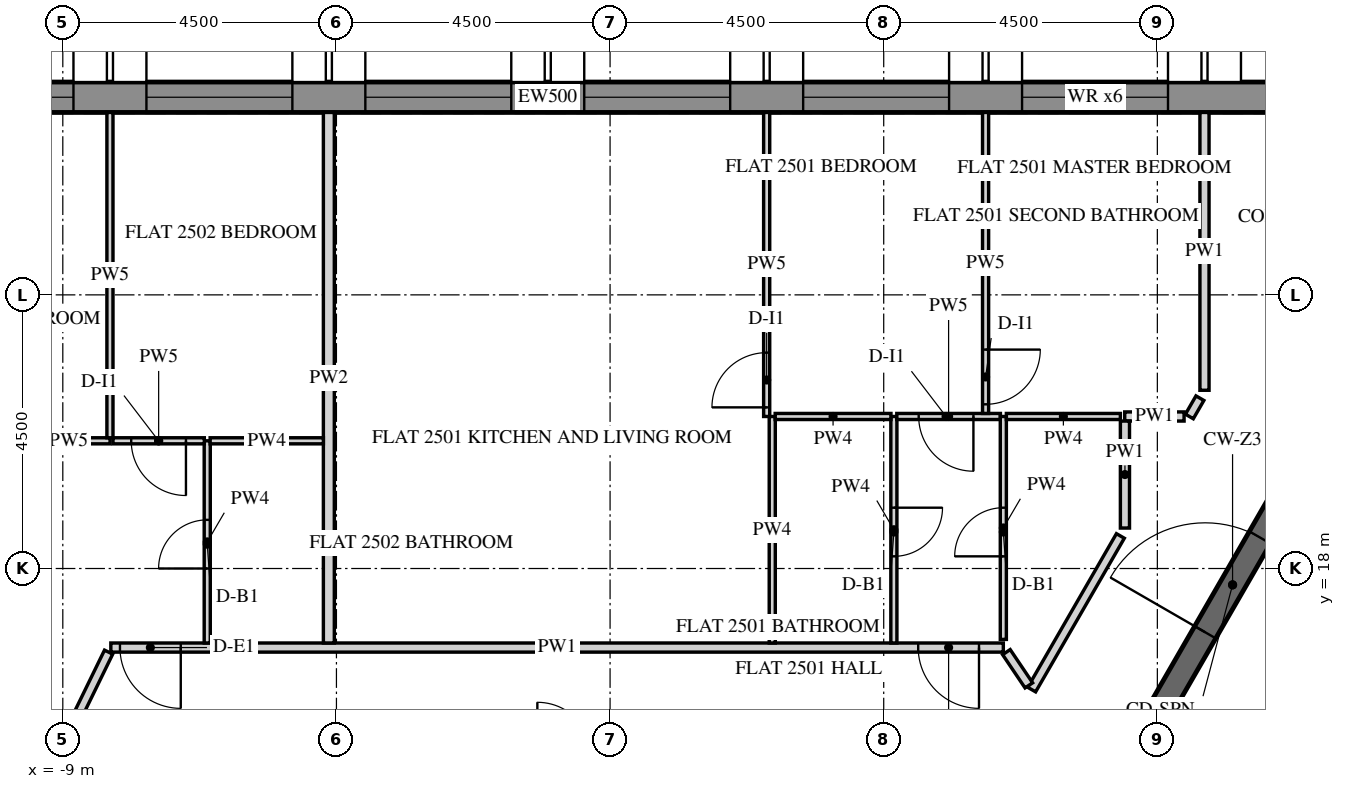
"""IFC4 building model, lengths in metres.
Left out: names, types, materials, properties, quantities, classifications, styles, units other than length and angle.
Written with IfcOpenShell. Run it as: python <this file> out.ifc"""

import sys

from ifc_helpers import new_model, si_unit, direction, frame, frame_2d, origin, place, context, subcontext, project, spatial, polyline, rectangle, outline, extrude, element, fill, save


model = new_model("IFC4")
c1 = context("Model", 3, precision=1e-05, world=origin(), true_north=direction((0.0, 1.0)))
c2 = subcontext(c1, "Body", "Model", "MODEL_VIEW")
j1 = project(units=[si_unit("LENGTHUNIT", "METRE"), si_unit("PLANEANGLEUNIT", "RADIAN")], contexts=[c1])
p1 = place(None, origin())
s1 = spatial("IfcSite", under=j1, at=p1, CompositionType="ELEMENT")
p2 = place(p1, origin())
s2 = spatial("IfcBuilding", under=s1, at=p2, CompositionType="ELEMENT")
p3 = place(p2, frame((0.0, 0.0, 314.7)))
s3 = spatial("IfcBuildingStorey", under=s2, at=p3, CompositionType="ELEMENT", Elevation=314.7)
p4 = place(p3, frame((11.698, 25.75, -0.15), z_axis=(0.0, 0.0, 1.0), x_axis=(-1.0, 0.0, 0.0)))
e1 = element("IfcWall", 1, at=p4, inside=s3, PredefinedType="SOLIDWALL", context=c2, shape_type="SweptSolid", body=[
    extrude(outline(polyline([(-0.021, -0.25), (25.468, -0.25), (25.421, 0.25), (0.021, 0.25), (-0.021, -0.25)])), origin(), (0.0, 0.0, 1.0), 3.9),
])
p5 = place(p4, frame((2.522, 0.0, 0.75)))
e2 = element("IfcOpeningElement", 2, at=p5, cuts=e1, PredefinedType="OPENING", context=c2, shape_type="SweptSolid", body=[
    extrude(rectangle(XDim=2.4, YDim=2.7, at=frame_2d((1.2, 1.35))), frame((0.0, 0.26, 0.0), z_axis=(0.0, -1.0, 0.0), x_axis=(1.0, 0.0, 0.0)), (0.0, 0.0, 1.0), 0.52),
])
p6 = place(p4, frame((6.122, 0.0, 0.75)))
e3 = element("IfcOpeningElement", 3, at=p6, cuts=e1, PredefinedType="OPENING", context=c2, shape_type="SweptSolid", body=[
    extrude(rectangle(XDim=2.4, YDim=2.7, at=frame_2d((1.2, 1.35))), frame((0.0, 0.26, 0.0), z_axis=(0.0, -1.0, 0.0), x_axis=(1.0, 0.0, 0.0)), (0.0, 0.0, 1.0), 0.52),
])
p7 = place(p4, frame((9.722, 0.0, 0.75)))
e4 = element("IfcOpeningElement", 4, at=p7, cuts=e1, PredefinedType="OPENING", context=c2, shape_type="SweptSolid", body=[
    extrude(rectangle(XDim=2.4, YDim=2.7, at=frame_2d((1.2, 1.35))), frame((0.0, 0.26, 0.0), z_axis=(0.0, -1.0, 0.0), x_axis=(1.0, 0.0, 0.0)), (0.0, 0.0, 1.0), 0.52),
])
p8 = place(p4, frame((13.323, 0.0, 0.75)))
e5 = element("IfcOpeningElement", 5, at=p8, cuts=e1, PredefinedType="OPENING", context=c2, shape_type="SweptSolid", body=[
    extrude(rectangle(XDim=2.4, YDim=2.7, at=frame_2d((1.2, 1.35))), frame((0.0, 0.26, 0.0), z_axis=(0.0, -1.0, 0.0), x_axis=(1.0, 0.0, 0.0)), (0.0, 0.0, 1.0), 0.52),
])
p9 = place(p4, frame((16.922, 0.0, 0.75)))
e6 = element("IfcOpeningElement", 6, at=p9, cuts=e1, PredefinedType="OPENING", context=c2, shape_type="SweptSolid", body=[
    extrude(rectangle(XDim=2.4, YDim=2.7, at=frame_2d((1.2, 1.35))), frame((0.0, 0.26, 0.0), z_axis=(0.0, -1.0, 0.0), x_axis=(1.0, 0.0, 0.0)), (0.0, 0.0, 1.0), 0.52),
])
p10 = place(p4, frame((20.522, 0.0, 0.75)))
e7 = element("IfcOpeningElement", 7, at=p10, cuts=e1, PredefinedType="OPENING", context=c2, shape_type="SweptSolid", body=[
    extrude(rectangle(XDim=2.4, YDim=2.7, at=frame_2d((1.2, 1.35))), frame((0.0, 0.26, 0.0), z_axis=(0.0, -1.0, 0.0), x_axis=(1.0, 0.0, 0.0)), (0.0, 0.0, 1.0), 0.52),
])
p11 = place(p3, frame((6.351, 11.0, -0.15), z_axis=(0.0, 0.0, 1.0), x_axis=(0.499998894578, 0.866026041999, 0.0)))
e8 = element("IfcWall", 8, at=p11, inside=s3, PredefinedType="SHEAR", context=c2, shape_type="SweptSolid", body=[
    extrude(rectangle(XDim=15.544, YDim=0.4, at=frame_2d((7.772, 0.0))), origin(), (0.0, 0.0, 1.0), 3.9),
])
p12 = place(p11, frame((6.872, 0.0, 0.15)))
e9 = element("IfcOpeningElement", 9, at=p12, cuts=e8, PredefinedType="OPENING", context=c2, shape_type="SweptSolid", body=[
    extrude(rectangle(XDim=1.8, YDim=2.4, at=frame_2d((0.9, 1.2))), frame((0.0, 0.21, 0.0), z_axis=(0.0, -1.0, 0.0), x_axis=(1.0, 0.0, 0.0)), (0.0, 0.0, 1.0), 0.42),
])
p13 = place(p3, frame((6.467, 16.7, 0.0), z_axis=(0.0, 0.0, 1.0), x_axis=(-1.0, 0.0, 0.0)))
e10 = element("IfcWall", 10, at=p13, inside=s3, PredefinedType="PARTITIONING", context=c2, shape_type="SweptSolid", body=[
    extrude(rectangle(XDim=14.677, YDim=0.15, at=frame_2d((7.339, 0.0))), origin(), (0.0, 0.0, 1.0), 2.988),
])
p14 = place(p13, frame((0.4, 0.0, 0.0)))
e11 = element("IfcOpeningElement", 11, at=p14, cuts=e10, PredefinedType="OPENING", context=c2, shape_type="SweptSolid", body=[
    extrude(rectangle(XDim=1.0, YDim=2.1, at=frame_2d((0.5, 1.05))), frame((0.0, 0.085, 0.0), z_axis=(0.0, -1.0, 0.0), x_axis=(1.0, 0.0, 0.0)), (0.0, 0.0, 1.0), 0.17),
])
p15 = place(p13, frame((13.527, 0.0, 0.0)))
e12 = element("IfcOpeningElement", 12, at=p15, cuts=e10, PredefinedType="OPENING", context=c2, shape_type="SweptSolid", body=[
    extrude(rectangle(XDim=1.0, YDim=2.1, at=frame_2d((0.5, 1.05))), frame((0.0, 0.085, 0.0), z_axis=(0.0, -1.0, 0.0), x_axis=(1.0, 0.0, 0.0)), (0.0, 0.0, 1.0), 0.17),
])
p16 = place(p3, frame((9.775, 25.5, 0.0), z_axis=(0.0, 0.0, 1.0), x_axis=(0.0, -1.0, 0.0)))
e13 = element("IfcWall", 13, at=p16, inside=s3, PredefinedType="PARTITIONING", context=c2, shape_type="SweptSolid", body=[
    extrude(rectangle(XDim=4.569, YDim=0.15, at=frame_2d((2.284, 0.0))), origin(), (0.0, 0.0, 1.0), 2.988),
])
p17 = place(p3, frame((9.7, 20.801, 0.0), z_axis=(0.0, 0.0, 1.0), x_axis=(-0.499762962979, -0.866162213927, 0.0)))
e14 = element("IfcWall", 14, at=p17, inside=s3, PredefinedType="PARTITIONING", context=c2, shape_type="SweptSolid", body=[
    extrude(rectangle(XDim=0.348, YDim=0.15, at=frame_2d((0.174, 0.0))), origin(), (0.0, 0.0, 1.0), 2.988),
])
p18 = place(p3, frame((9.44, 20.5, 0.0), z_axis=(0.0, 0.0, 1.0), x_axis=(-1.0, 0.0, 0.0)))
e15 = element("IfcWall", 15, at=p18, inside=s3, PredefinedType="PARTITIONING", context=c2, shape_type="SweptSolid", body=[
    extrude(rectangle(XDim=0.976, YDim=0.15, at=frame_2d((0.488, 0.0))), origin(), (0.0, 0.0, 1.0), 2.988),
])
p19 = place(p3, frame((8.467, 20.425, 0.0), z_axis=(0.0, 0.0, 1.0), x_axis=(0.0, -1.0, 0.0)))
e16 = element("IfcWall", 16, at=p19, inside=s3, PredefinedType="PARTITIONING", context=c2, shape_type="SweptSolid", body=[
    extrude(rectangle(XDim=1.76, YDim=0.15, at=frame_2d((0.88, 0.0))), origin(), (0.0, 0.0, 1.0), 2.988),
])
p20 = place(p3, frame((8.392, 18.536, 0.0), z_axis=(0.0, 0.0, 1.0), x_axis=(-0.49996389635, -0.866046247233, 0.0)))
e17 = element("IfcWall", 17, at=p20, inside=s3, PredefinedType="PARTITIONING", context=c2, shape_type="SweptSolid", body=[
    extrude(rectangle(XDim=2.918, YDim=0.15, at=frame_2d((1.459, 0.0))), origin(), (0.0, 0.0, 1.0), 2.988),
])
p21 = place(p3, frame((6.887, 16.078, 0.0), z_axis=(0.0, 0.0, 1.0), x_axis=(-0.559472855001, 0.828848674076, 0.0)))
e18 = element("IfcWall", 18, at=p21, inside=s3, PredefinedType="PARTITIONING", context=c2, shape_type="SweptSolid", body=[
    extrude(rectangle(XDim=0.66, YDim=0.15, at=frame_2d((0.33, 0.0))), origin(), (0.0, 0.0, 1.0), 2.988),
])
p22 = place(p3, frame((-8.247, 16.625, 0.0), z_axis=(0.0, 0.0, 1.0), x_axis=(-0.438381655451, -0.898788920806, 0.0)))
e19 = element("IfcWall", 19, at=p22, inside=s3, PredefinedType="PARTITIONING", context=c2, shape_type="SweptSolid", body=[
    extrude(rectangle(XDim=16.272, YDim=0.15, at=frame_2d((8.136, 0.0))), origin(), (0.0, 0.0, 1.0), 2.988),
])
p23 = place(p22, frame((5.703, 0.0, 0.0)))
e20 = element("IfcOpeningElement", 20, at=p23, cuts=e19, PredefinedType="OPENING", context=c2, shape_type="SweptSolid", body=[
    extrude(rectangle(XDim=1.0, YDim=2.1, at=frame_2d((0.5, 1.05))), frame((0.0, 0.085, 0.0), z_axis=(0.0, -1.0, 0.0), x_axis=(1.0, 0.0, 0.0)), (0.0, 0.0, 1.0), 0.17),
])
p24 = place(p3, frame((9.464, 12.392, 0.0), z_axis=(0.0, 0.0, 1.0), x_axis=(0.499999400414, 0.866025749955, 0.0)))
e21 = element("IfcWall", 21, at=p24, inside=s3, PredefinedType="PARTITIONING", context=c2, shape_type="SweptSolid", body=[
    extrude(rectangle(XDim=7.911, YDim=0.15, at=frame_2d((3.955, 0.0))), origin(), (0.0, 0.0, 1.0), 2.988),
])
p25 = place(p24, frame((0.82, 0.0, 0.0)))
e22 = element("IfcOpeningElement", 22, at=p25, cuts=e21, PredefinedType="OPENING", context=c2, shape_type="SweptSolid", body=[
    extrude(rectangle(XDim=1.0, YDim=2.1, at=frame_2d((0.5, 1.05))), frame((0.0, 0.085, 0.0), z_axis=(0.0, -1.0, 0.0), x_axis=(1.0, 0.0, 0.0)), (0.0, 0.0, 1.0), 0.17),
])
p26 = place(p24, frame((4.817, 0.0, 0.0)))
e23 = element("IfcOpeningElement", 23, at=p26, cuts=e21, PredefinedType="OPENING", context=c2, shape_type="SweptSolid", body=[
    extrude(rectangle(XDim=1.0, YDim=2.1, at=frame_2d((0.5, 1.05))), frame((0.0, 0.085, 0.0), z_axis=(0.0, -1.0, 0.0), x_axis=(1.0, 0.0, 0.0)), (0.0, 0.0, 1.0), 0.17),
])
p27 = place(p3, frame((2.667, 16.775, 0.0), z_axis=(0.0, 0.0, 1.0), x_axis=(0.0, 1.0, 0.0)))
e24 = element("IfcWall", 24, at=p27, inside=s3, PredefinedType="PARTITIONING", context=c2, shape_type="SweptSolid", body=[
    extrude(rectangle(XDim=3.725, YDim=0.1, at=frame_2d((1.863, 0.0))), origin(), (0.0, 0.0, 1.0), 2.988),
])
p28 = place(p3, frame((2.575, 20.5, 0.0), z_axis=(0.0, 0.0, 1.0), x_axis=(0.0, 1.0, 0.0)))
e25 = element("IfcWall", 25, at=p28, inside=s3, PredefinedType="PARTITIONING", context=c2, shape_type="SweptSolid", body=[
    extrude(rectangle(XDim=5.0, YDim=0.1, at=frame_2d((2.5, 0.0))), origin(), (0.0, 0.0, 1.0), 2.988),
])
p29 = place(p28, frame((0.15, 0.0, 0.0)))
e26 = element("IfcOpeningElement", 26, at=p29, cuts=e25, PredefinedType="OPENING", context=c2, shape_type="SweptSolid", body=[
    extrude(rectangle(XDim=0.9, YDim=2.1, at=frame_2d((0.45, 1.05))), frame((0.0, 0.06, 0.0), z_axis=(0.0, -1.0, 0.0), x_axis=(1.0, 0.0, 0.0)), (0.0, 0.0, 1.0), 0.12),
])
p30 = place(p3, frame((-4.625, 25.5, 0.0), z_axis=(0.0, 0.0, 1.0), x_axis=(0.0, -1.0, 0.0)))
e27 = element("IfcWall", 27, at=p30, inside=s3, PredefinedType="PARTITIONING", context=c2, shape_type="SweptSolid", body=[
    extrude(rectangle(XDim=8.725, YDim=0.18, at=frame_2d((4.363, 0.0))), origin(), (0.0, 0.0, 1.0), 2.988),
])
p31 = place(p3, frame((4.667, 20.5, 0.0), z_axis=(0.0, 0.0, 1.0), x_axis=(0.0, -1.0, 0.0)))
e28 = element("IfcWall", 28, at=p31, inside=s3, PredefinedType="PARTITIONING", context=c2, shape_type="SweptSolid", body=[
    extrude(rectangle(XDim=3.725, YDim=0.1, at=frame_2d((1.863, 0.0))), origin(), (0.0, 0.0, 1.0), 2.988),
])
p32 = place(p31, frame((1.5, 0.0, 0.0)))
e29 = element("IfcOpeningElement", 29, at=p32, cuts=e28, PredefinedType="OPENING", context=c2, shape_type="SweptSolid", body=[
    extrude(rectangle(XDim=0.8, YDim=2.1, at=frame_2d((0.4, 1.05))), frame((0.0, 0.06, 0.0), z_axis=(0.0, -1.0, 0.0), x_axis=(1.0, 0.0, 0.0)), (0.0, 0.0, 1.0), 0.12),
])
p33 = place(p3, frame((6.419, 20.5, 0.0), z_axis=(0.0, 0.0, 1.0), x_axis=(-1.0, 0.0, 0.0)))
e30 = element("IfcWall", 30, at=p33, inside=s3, PredefinedType="PARTITIONING", context=c2, shape_type="SweptSolid", body=[
    extrude(rectangle(XDim=1.704, YDim=0.1, at=frame_2d((0.852, 0.0))), origin(), (0.0, 0.0, 1.0), 2.988),
])
p34 = place(p33, frame((0.444, 0.0, 0.0)))
e31 = element("IfcOpeningElement", 31, at=p34, cuts=e30, PredefinedType="OPENING", context=c2, shape_type="SweptSolid", body=[
    extrude(rectangle(XDim=0.9, YDim=2.1, at=frame_2d((0.45, 1.05))), frame((0.0, 0.06, 0.0), z_axis=(0.0, -1.0, 0.0), x_axis=(1.0, 0.0, 0.0)), (0.0, 0.0, 1.0), 0.12),
])
p35 = place(p3, frame((6.467, 16.834, 0.0), z_axis=(0.0, 0.0, 1.0), x_axis=(0.0, 1.0, 0.0)))
e32 = element("IfcWall", 32, at=p35, inside=s3, PredefinedType="PARTITIONING", context=c2, shape_type="SweptSolid", body=[
    extrude(rectangle(XDim=3.666, YDim=0.1, at=frame_2d((1.833, 0.0))), origin(), (0.0, 0.0, 1.0), 2.988),
])
p36 = place(p35, frame((1.366, 0.0, 0.0)))
e33 = element("IfcOpeningElement", 33, at=p36, cuts=e32, PredefinedType="OPENING", context=c2, shape_type="SweptSolid", body=[
    extrude(rectangle(XDim=0.8, YDim=2.1, at=frame_2d((0.4, 1.05))), frame((0.0, 0.06, 0.0), z_axis=(0.0, -1.0, 0.0), x_axis=(1.0, 0.0, 0.0)), (0.0, 0.0, 1.0), 0.12),
])
p37 = place(p3, frame((4.619, 20.5, 0.0), z_axis=(0.0, 0.0, 1.0), x_axis=(-1.0, 0.0, 0.0)))
e34 = element("IfcWall", 34, at=p37, inside=s3, PredefinedType="PARTITIONING", context=c2, shape_type="SweptSolid", body=[
    extrude(rectangle(XDim=1.904, YDim=0.1, at=frame_2d((0.952, 0.0))), origin(), (0.0, 0.0, 1.0), 2.988),
])
p38 = place(p3, frame((6.175, 25.5, 0.0), z_axis=(0.0, 0.0, 1.0), x_axis=(0.0, -1.0, 0.0)))
e35 = element("IfcWall", 35, at=p38, inside=s3, PredefinedType="PARTITIONING", context=c2, shape_type="SweptSolid", body=[
    extrude(rectangle(XDim=4.95, YDim=0.1, at=frame_2d((2.475, 0.0))), origin(), (0.0, 0.0, 1.0), 2.988),
])
p39 = place(p38, frame((3.9, 0.0, 0.0)))
e36 = element("IfcOpeningElement", 36, at=p39, cuts=e35, PredefinedType="OPENING", context=c2, shape_type="SweptSolid", body=[
    extrude(rectangle(XDim=0.9, YDim=2.1, at=frame_2d((0.45, 1.05))), frame((0.0, 0.06, 0.0), z_axis=(0.0, -1.0, 0.0), x_axis=(1.0, 0.0, 0.0)), (0.0, 0.0, 1.0), 0.12),
])
p40 = place(p3, frame((6.517, 20.5, 0.0), z_axis=(0.0, 0.0, 1.0), x_axis=(1.0, 0.0, 0.0)))
e37 = element("IfcWall", 37, at=p40, inside=s3, PredefinedType="PARTITIONING", context=c2, shape_type="SweptSolid", body=[
    extrude(rectangle(XDim=1.875, YDim=0.1, at=frame_2d((0.938, 0.0))), origin(), (0.0, 0.0, 1.0), 2.988),
])
p41 = place(p3, frame((-9.575, 20.1, 0.0), z_axis=(0.0, 0.0, 1.0), x_axis=(1.0, 0.0, 0.0)))
e38 = element("IfcWall", 38, at=p41, inside=s3, PredefinedType="PARTITIONING", context=c2, shape_type="SweptSolid", body=[
    extrude(rectangle(XDim=1.352, YDim=0.1, at=frame_2d((0.676, 0.0))), origin(), (0.0, 0.0, 1.0), 2.988),
])
p42 = place(p3, frame((-8.225, 20.15, 0.0), z_axis=(0.0, 0.0, 1.0), x_axis=(0.0, 1.0, 0.0)))
e39 = element("IfcWall", 39, at=p42, inside=s3, PredefinedType="PARTITIONING", context=c2, shape_type="SweptSolid", body=[
    extrude(rectangle(XDim=5.35, YDim=0.1, at=frame_2d((2.675, 0.0))), origin(), (0.0, 0.0, 1.0), 2.988),
])
p43 = place(p3, frame((-6.625, 16.775, 0.0), z_axis=(0.0, 0.0, 1.0), x_axis=(0.0, 1.0, 0.0)))
e40 = element("IfcWall", 40, at=p43, inside=s3, PredefinedType="PARTITIONING", context=c2, shape_type="SweptSolid", body=[
    extrude(rectangle(XDim=3.325, YDim=0.1, at=frame_2d((1.663, 0.0))), origin(), (0.0, 0.0, 1.0), 2.988),
])
p44 = place(p43, frame((1.225, 0.0, 0.0)))
e41 = element("IfcOpeningElement", 41, at=p44, cuts=e40, PredefinedType="OPENING", context=c2, shape_type="SweptSolid", body=[
    extrude(rectangle(XDim=0.8, YDim=2.1, at=frame_2d((0.4, 1.05))), frame((0.0, 0.06, 0.0), z_axis=(0.0, -1.0, 0.0), x_axis=(1.0, 0.0, 0.0)), (0.0, 0.0, 1.0), 0.12),
])
p45 = place(p3, frame((-6.673, 20.1, 0.0), z_axis=(0.0, 0.0, 1.0), x_axis=(-1.0, 0.0, 0.0)))
e42 = element("IfcWall", 42, at=p45, inside=s3, PredefinedType="PARTITIONING", context=c2, shape_type="SweptSolid", body=[
    extrude(rectangle(XDim=1.502, YDim=0.1, at=frame_2d((0.751, 0.0))), origin(), (0.0, 0.0, 1.0), 2.988),
])
p46 = place(p45, frame((0.302, 0.0, 0.0)))
e43 = element("IfcOpeningElement", 43, at=p46, cuts=e42, PredefinedType="OPENING", context=c2, shape_type="SweptSolid", body=[
    extrude(rectangle(XDim=0.9, YDim=2.1, at=frame_2d((0.45, 1.05))), frame((0.0, 0.06, 0.0), z_axis=(0.0, -1.0, 0.0), x_axis=(1.0, 0.0, 0.0)), (0.0, 0.0, 1.0), 0.12),
])
p47 = place(p3, frame((-4.715, 20.1, 0.0), z_axis=(0.0, 0.0, 1.0), x_axis=(-1.0, 0.0, 0.0)))
e44 = element("IfcWall", 44, at=p47, inside=s3, PredefinedType="PARTITIONING", context=c2, shape_type="SweptSolid", body=[
    extrude(rectangle(XDim=1.862, YDim=0.1, at=frame_2d((0.931, 0.0))), origin(), (0.0, 0.0, 1.0), 2.988),
])
p48 = place(p5, frame((0.0, 0.18, 0.0)))
e45 = element("IfcWindow", 45, at=p48, inside=s3, PartitioningType="DOUBLE_PANEL_VERTICAL", PredefinedType="WINDOW", context=c2, shape_type="SweptSolid", body=[
    extrude(rectangle(XDim=2.4, YDim=2.7, at=frame_2d((1.2, 1.35))), frame((0.0, 0.03, 0.0), z_axis=(0.0, -1.0, 0.0), x_axis=(1.0, 0.0, 0.0)), (0.0, 0.0, 1.0), 0.06),
])
fill(e2, e45)
p49 = place(p6, frame((0.0, 0.18, 0.0)))
e46 = element("IfcWindow", 46, at=p49, inside=s3, PartitioningType="DOUBLE_PANEL_VERTICAL", PredefinedType="WINDOW", context=c2, shape_type="SweptSolid", body=[
    extrude(rectangle(XDim=2.4, YDim=2.7, at=frame_2d((1.2, 1.35))), frame((0.0, 0.03, 0.0), z_axis=(0.0, -1.0, 0.0), x_axis=(1.0, 0.0, 0.0)), (0.0, 0.0, 1.0), 0.06),
])
fill(e3, e46)
p50 = place(p7, frame((0.0, 0.18, 0.0)))
e47 = element("IfcWindow", 47, at=p50, inside=s3, PartitioningType="DOUBLE_PANEL_VERTICAL", PredefinedType="WINDOW", context=c2, shape_type="SweptSolid", body=[
    extrude(rectangle(XDim=2.4, YDim=2.7, at=frame_2d((1.2, 1.35))), frame((0.0, 0.03, 0.0), z_axis=(0.0, -1.0, 0.0), x_axis=(1.0, 0.0, 0.0)), (0.0, 0.0, 1.0), 0.06),
])
fill(e4, e47)
p51 = place(p8, frame((0.0, 0.18, 0.0)))
e48 = element("IfcWindow", 48, at=p51, inside=s3, PartitioningType="DOUBLE_PANEL_VERTICAL", PredefinedType="WINDOW", context=c2, shape_type="SweptSolid", body=[
    extrude(rectangle(XDim=2.4, YDim=2.7, at=frame_2d((1.2, 1.35))), frame((0.0, 0.03, 0.0), z_axis=(0.0, -1.0, 0.0), x_axis=(1.0, 0.0, 0.0)), (0.0, 0.0, 1.0), 0.06),
])
fill(e5, e48)
p52 = place(p9, frame((0.0, 0.18, 0.0)))
e49 = element("IfcWindow", 49, at=p52, inside=s3, PartitioningType="DOUBLE_PANEL_VERTICAL", PredefinedType="WINDOW", context=c2, shape_type="SweptSolid", body=[
    extrude(rectangle(XDim=2.4, YDim=2.7, at=frame_2d((1.2, 1.35))), frame((0.0, 0.03, 0.0), z_axis=(0.0, -1.0, 0.0), x_axis=(1.0, 0.0, 0.0)), (0.0, 0.0, 1.0), 0.06),
])
fill(e6, e49)
p53 = place(p10, frame((0.0, 0.18, 0.0)))
e50 = element("IfcWindow", 50, at=p53, inside=s3, PartitioningType="DOUBLE_PANEL_VERTICAL", PredefinedType="WINDOW", context=c2, shape_type="SweptSolid", body=[
    extrude(rectangle(XDim=2.4, YDim=2.7, at=frame_2d((1.2, 1.35))), frame((0.0, 0.03, 0.0), z_axis=(0.0, -1.0, 0.0), x_axis=(1.0, 0.0, 0.0)), (0.0, 0.0, 1.0), 0.06),
])
fill(e7, e50)
p54 = place(p12, origin())
e51 = element("IfcDoor", 51, at=p54, inside=s3, OperationType="DOUBLE_DOOR_SINGLE_SWING", PredefinedType="DOOR", context=c2, shape_type="SweptSolid", body=[
    extrude(rectangle(XDim=1.8, YDim=2.4, at=frame_2d((0.9, 1.2))), frame((0.0, 0.025, 0.0), z_axis=(0.0, -1.0, 0.0), x_axis=(1.0, 0.0, 0.0)), (0.0, 0.0, 1.0), 0.05),
])
fill(e9, e51)
p55 = place(p14, origin())
e52 = element("IfcDoor", 52, at=p55, inside=s3, OperationType="SINGLE_SWING_RIGHT", PredefinedType="DOOR", context=c2, shape_type="SweptSolid", body=[
    extrude(rectangle(XDim=1.0, YDim=2.1, at=frame_2d((0.5, 1.05))), frame((0.0, 0.025, 0.0), z_axis=(0.0, -1.0, 0.0), x_axis=(1.0, 0.0, 0.0)), (0.0, 0.0, 1.0), 0.05),
])
fill(e11, e52)
p56 = place(p32, origin())
e53 = element("IfcDoor", 53, at=p56, inside=s3, OperationType="SINGLE_SWING_LEFT", PredefinedType="DOOR", context=c2, shape_type="SweptSolid", body=[
    extrude(rectangle(XDim=0.8, YDim=2.1, at=frame_2d((0.4, 1.05))), frame((0.0, 0.025, 0.0), z_axis=(0.0, -1.0, 0.0), x_axis=(1.0, 0.0, 0.0)), (0.0, 0.0, 1.0), 0.05),
])
fill(e29, e53)
p57 = place(p34, origin())
e54 = element("IfcDoor", 54, at=p57, inside=s3, OperationType="SINGLE_SWING_RIGHT", PredefinedType="DOOR", context=c2, shape_type="SweptSolid", body=[
    extrude(rectangle(XDim=0.9, YDim=2.1, at=frame_2d((0.45, 1.05))), frame((0.0, 0.025, 0.0), z_axis=(0.0, -1.0, 0.0), x_axis=(1.0, 0.0, 0.0)), (0.0, 0.0, 1.0), 0.05),
])
fill(e31, e54)
p58 = place(p39, origin())
e55 = element("IfcDoor", 55, at=p58, inside=s3, OperationType="SINGLE_SWING_RIGHT", PredefinedType="DOOR", context=c2, shape_type="SweptSolid", body=[
    extrude(rectangle(XDim=0.9, YDim=2.1, at=frame_2d((0.45, 1.05))), frame((0.0, 0.025, 0.0), z_axis=(0.0, -1.0, 0.0), x_axis=(1.0, 0.0, 0.0)), (0.0, 0.0, 1.0), 0.05),
])
fill(e36, e55)
p59 = place(p29, origin())
e56 = element("IfcDoor", 56, at=p59, inside=s3, OperationType="SINGLE_SWING_RIGHT", PredefinedType="DOOR", context=c2, shape_type="SweptSolid", body=[
    extrude(rectangle(XDim=0.9, YDim=2.1, at=frame_2d((0.45, 1.05))), frame((0.0, 0.025, 0.0), z_axis=(0.0, -1.0, 0.0), x_axis=(1.0, 0.0, 0.0)), (0.0, 0.0, 1.0), 0.05),
])
fill(e26, e56)
p60 = place(p36, origin())
e57 = element("IfcDoor", 57, at=p60, inside=s3, OperationType="SINGLE_SWING_RIGHT", PredefinedType="DOOR", context=c2, shape_type="SweptSolid", body=[
    extrude(rectangle(XDim=0.8, YDim=2.1, at=frame_2d((0.4, 1.05))), frame((0.0, 0.025, 0.0), z_axis=(0.0, -1.0, 0.0), x_axis=(1.0, 0.0, 0.0)), (0.0, 0.0, 1.0), 0.05),
])
fill(e33, e57)
p61 = place(p15, origin())
e58 = element("IfcDoor", 58, at=p61, inside=s3, OperationType="SINGLE_SWING_LEFT", PredefinedType="DOOR", context=c2, shape_type="SweptSolid", body=[
    extrude(rectangle(XDim=1.0, YDim=2.1, at=frame_2d((0.5, 1.05))), frame((0.0, 0.025, 0.0), z_axis=(0.0, -1.0, 0.0), x_axis=(1.0, 0.0, 0.0)), (0.0, 0.0, 1.0), 0.05),
])
fill(e12, e58)
p62 = place(p44, origin())
e59 = element("IfcDoor", 59, at=p62, inside=s3, OperationType="SINGLE_SWING_RIGHT", PredefinedType="DOOR", context=c2, shape_type="SweptSolid", body=[
    extrude(rectangle(XDim=0.8, YDim=2.1, at=frame_2d((0.4, 1.05))), frame((0.0, 0.025, 0.0), z_axis=(0.0, -1.0, 0.0), x_axis=(1.0, 0.0, 0.0)), (0.0, 0.0, 1.0), 0.05),
])
fill(e41, e59)
p63 = place(p46, origin())
e60 = element("IfcDoor", 60, at=p63, inside=s3, OperationType="SINGLE_SWING_RIGHT", PredefinedType="DOOR", context=c2, shape_type="SweptSolid", body=[
    extrude(rectangle(XDim=0.9, YDim=2.1, at=frame_2d((0.45, 1.05))), frame((0.0, 0.025, 0.0), z_axis=(0.0, -1.0, 0.0), x_axis=(1.0, 0.0, 0.0)), (0.0, 0.0, 1.0), 0.05),
])
fill(e43, e60)
save(model, sys.argv[1])
